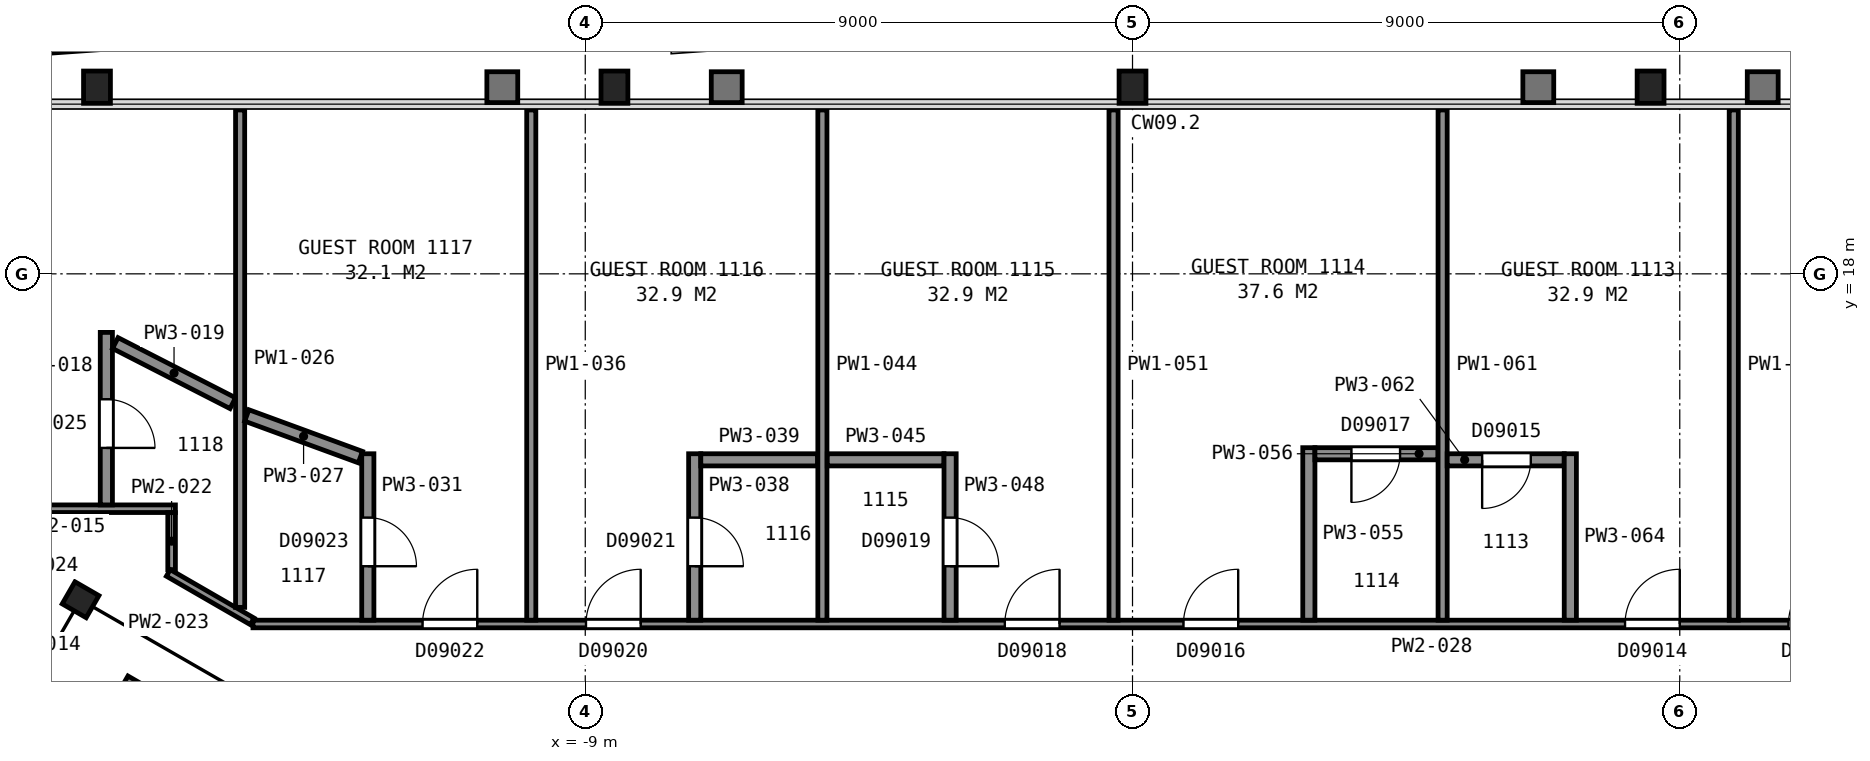
"""IFC4 building model, lengths in metres.
Left out: names, types, materials, properties, quantities, classifications, styles, units other than length and angle.
Written with IfcOpenShell. Run it as: python <this file> out.ifc"""

import sys

from ifc_helpers import new_model, si_unit, direction, frame, frame_2d, origin, origin_2d, place, context, subcontext, project, spatial, rectangle, i_section, extrude, element, fill, save


model = new_model("IFC4")
c1 = context("Model", 3, precision=1e-05, world=origin(), true_north=direction((0.0, 1.0)))
c2 = subcontext(c1, "Body", "Model", "MODEL_VIEW")
j1 = project(units=[si_unit("LENGTHUNIT", "METRE"), si_unit("PLANEANGLEUNIT", "RADIAN")], contexts=[c1])
p1 = place(None, origin())
s1 = spatial("IfcSite", under=j1, at=p1, CompositionType="ELEMENT")
p2 = place(p1, origin())
s2 = spatial("IfcBuilding", under=s1, at=p2, CompositionType="ELEMENT")
p3 = place(p2, frame((0.0, 0.0, 54.8)))
s3 = spatial("IfcBuildingStorey", under=s2, at=p3, CompositionType="ELEMENT", Elevation=54.8)
for number, where, z_axis, x_axis in (
    (1, (8.52, 21.07, 0.0), (0.0, 0.0, 1.0), (1.0, 0.0, 0.0)),
    (2, (0.0, 21.07, 0.0), (0.0, 0.0, 1.0), (1.0, 0.0, 0.0)),
    (3, (-8.52, 21.07, 0.0), (0.0, 0.0, 1.0), (1.0, 0.0, 0.0)),
    (4, (-17.03, 21.07, 0.0), (0.0, 0.0, 1.0), (1.0, 0.0, 0.0)),
):
    element("IfcColumn", number, at=place(p3, frame(where, z_axis=z_axis, x_axis=x_axis)), inside=s3, PredefinedType="COLUMN", context=c2, shape_type="SweptSolid", body=[
        extrude(i_section(OverallWidth=0.442, OverallDepth=0.531, WebThickness=0.066, FlangeThickness=0.106, FilletRadius=0.015, at=origin_2d()), origin(), (0.0, 0.0, 1.0), 3.6),
    ])
p4 = place(p3, frame((-17.3, 12.64, 0.0), z_axis=(0.0, 0.0, 1.0), x_axis=(0.5, 0.866025403784, 0.0)))
e5 = element("IfcColumn", 5, at=p4, inside=s3, PredefinedType="COLUMN", context=c2, shape_type="SweptSolid", body=[
    extrude(i_section(OverallWidth=0.419, OverallDepth=0.455, WebThickness=0.042, FlangeThickness=0.068, FilletRadius=0.015, at=origin_2d()), origin(), (0.0, 0.0, 1.0), 3.6),
])
for number, where, z_axis, x_axis in (
    (6, (6.178, 5.299, 0.0), (0.0, 0.0, 1.0), (0.866, 0.5, 0.0)),
    (7, (-6.178, 5.299, 0.0), (0.0, 0.0, 1.0), (-0.866, 0.5, 0.0)),
):
    element("IfcWall", number, at=place(p3, frame(where, z_axis=z_axis, x_axis=x_axis)), inside=s3, PredefinedType="PARTITIONING", context=c2, shape_type="SweptSolid", body=[
        extrude(rectangle(XDim=12.0, YDim=0.2, at=frame_2d((6.0, 0.0))), origin(), (0.0, 0.0, 1.0), 3.35),
    ])
p5 = place(p3, frame((-18.86, 14.137, 0.0), z_axis=(0.0, 0.0, 1.0), x_axis=(1.0, 0.0, 0.0)))
e8 = element("IfcWall", 8, at=p5, inside=s3, PredefinedType="PARTITIONING", context=c2, shape_type="SweptSolid", body=[
    extrude(rectangle(XDim=3.119, YDim=0.125, at=frame_2d((1.56, 0.0))), origin(), (0.0, 0.0, 1.0), 2.613),
])
p6 = place(p3, frame((-16.876, 17.037, 0.0), z_axis=(0.0, 0.0, 1.0), x_axis=(0.0, -1.0, 0.0)))
e9 = element("IfcWall", 9, at=p6, inside=s3, PredefinedType="PARTITIONING", context=c2, shape_type="SweptSolid", body=[
    extrude(rectangle(XDim=2.838, YDim=0.2, at=frame_2d((1.419, 0.0))), origin(), (0.0, 0.0, 1.0), 2.613),
])
p7 = place(p6, frame((1.1, 0.0, 0.0)))
e10 = element("IfcOpeningElement", 10, at=p7, cuts=e9, PredefinedType="OPENING", context=c2, shape_type="SweptSolid", body=[
    extrude(rectangle(XDim=0.8, YDim=2.1, at=frame_2d((0.4, 1.05))), frame((0.0, 0.11, 0.0), z_axis=(0.0, -1.0, 0.0), x_axis=(1.0, 0.0, 0.0)), (0.0, 0.0, 1.0), 0.22),
])
p8 = place(p3, frame((-16.729, 16.862, 0.0), z_axis=(0.0, 0.0, 1.0), x_axis=(0.890181338078, -0.455606392995, 0.0)))
e11 = element("IfcWall", 11, at=p8, inside=s3, PredefinedType="PARTITIONING", context=c2, shape_type="SweptSolid", body=[
    extrude(rectangle(XDim=2.171, YDim=0.2, at=frame_2d((1.085, 0.0))), origin(), (0.0, 0.0, 1.0), 2.613),
])
p9 = place(p3, frame((-15.803, 13.135, 0.0), z_axis=(0.0, 0.0, 1.0), x_axis=(0.0, 1.0, 0.0)))
e12 = element("IfcWall", 12, at=p9, inside=s3, PredefinedType="PARTITIONING", context=c2, shape_type="SweptSolid", body=[
    extrude(rectangle(XDim=0.937, YDim=0.125, at=frame_2d((0.469, 0.0))), origin(), (0.0, 0.0, 1.0), 2.613),
])
p10 = place(p3, frame((-15.857, 13.081, 0.0), z_axis=(0.0, 0.0, 1.0), x_axis=(0.865974057503, -0.500088923824, 0.0)))
e13 = element("IfcWall", 13, at=p10, inside=s3, PredefinedType="PARTITIONING", context=c2, shape_type="SweptSolid", body=[
    extrude(rectangle(XDim=1.595, YDim=0.125, at=frame_2d((0.798, 0.0))), origin(), (0.0, 0.0, 1.0), 2.613),
])
p11 = place(p3, frame((-14.676, 12.514, 0.0), z_axis=(0.0, 0.0, 1.0), x_axis=(0.0, 1.0, 0.0)))
e14 = element("IfcWall", 14, at=p11, inside=s3, PredefinedType="PARTITIONING", context=c2, shape_type="SweptSolid", body=[
    extrude(rectangle(XDim=8.181, YDim=0.15, at=frame_2d((4.09, 0.0))), origin(), (0.0, 0.0, 1.0), 2.613),
])
p12 = place(p3, frame((-14.567, 15.671, 0.0), z_axis=(0.0, 0.0, 1.0), x_axis=(0.938894816734, -0.344204188105, 0.0)))
e15 = element("IfcWall", 15, at=p12, inside=s3, PredefinedType="PARTITIONING", context=c2, shape_type="SweptSolid", body=[
    extrude(rectangle(XDim=1.99, YDim=0.2, at=frame_2d((0.995, 0.0))), origin(), (0.0, 0.0, 1.0), 2.613),
])
p13 = place(p3, frame((-14.465, 12.241, 0.0), z_axis=(0.0, 0.0, 1.0), x_axis=(1.0, 0.0, 0.0)))
e16 = element("IfcWall", 16, at=p13, inside=s3, PredefinedType="PARTITIONING", context=c2, shape_type="SweptSolid", body=[
    extrude(rectangle(XDim=28.929, YDim=0.125, at=frame_2d((14.465, 0.0))), origin(), (0.0, 0.0, 1.0), 2.613),
])
p14 = place(p13, frame((25.252, 0.0, 0.0)))
e17 = element("IfcOpeningElement", 17, at=p14, cuts=e16, PredefinedType="OPENING", context=c2, shape_type="SweptSolid", body=[
    extrude(rectangle(XDim=0.9, YDim=2.1, at=frame_2d((0.45, 1.05))), frame((0.0, 0.073, 0.0), z_axis=(0.0, -1.0, 0.0), x_axis=(1.0, 0.0, 0.0)), (0.0, 0.0, 1.0), 0.145),
])
p15 = place(p13, frame((22.564, 0.0, 0.0)))
e18 = element("IfcOpeningElement", 18, at=p15, cuts=e16, PredefinedType="OPENING", context=c2, shape_type="SweptSolid", body=[
    extrude(rectangle(XDim=0.9, YDim=2.1, at=frame_2d((0.45, 1.05))), frame((0.0, 0.073, 0.0), z_axis=(0.0, -1.0, 0.0), x_axis=(1.0, 0.0, 0.0)), (0.0, 0.0, 1.0), 0.145),
])
p16 = place(p13, frame((15.302, 0.0, 0.0)))
e19 = element("IfcOpeningElement", 19, at=p16, cuts=e16, PredefinedType="OPENING", context=c2, shape_type="SweptSolid", body=[
    extrude(rectangle(XDim=0.9, YDim=2.1, at=frame_2d((0.45, 1.05))), frame((0.0, 0.073, 0.0), z_axis=(0.0, -1.0, 0.0), x_axis=(1.0, 0.0, 0.0)), (0.0, 0.0, 1.0), 0.145),
])
p17 = place(p13, frame((12.365, 0.0, 0.0)))
e20 = element("IfcOpeningElement", 20, at=p17, cuts=e16, PredefinedType="OPENING", context=c2, shape_type="SweptSolid", body=[
    extrude(rectangle(XDim=0.9, YDim=2.1, at=frame_2d((0.45, 1.05))), frame((0.0, 0.073, 0.0), z_axis=(0.0, -1.0, 0.0), x_axis=(1.0, 0.0, 0.0)), (0.0, 0.0, 1.0), 0.145),
])
p18 = place(p13, frame((5.477, 0.0, 0.0)))
e21 = element("IfcOpeningElement", 21, at=p18, cuts=e16, PredefinedType="OPENING", context=c2, shape_type="SweptSolid", body=[
    extrude(rectangle(XDim=0.9, YDim=2.1, at=frame_2d((0.45, 1.05))), frame((0.0, 0.073, 0.0), z_axis=(0.0, -1.0, 0.0), x_axis=(1.0, 0.0, 0.0)), (0.0, 0.0, 1.0), 0.145),
])
p19 = place(p13, frame((2.789, 0.0, 0.0)))
e22 = element("IfcOpeningElement", 22, at=p19, cuts=e16, PredefinedType="OPENING", context=c2, shape_type="SweptSolid", body=[
    extrude(rectangle(XDim=0.9, YDim=2.1, at=frame_2d((0.45, 1.05))), frame((0.0, 0.073, 0.0), z_axis=(0.0, -1.0, 0.0), x_axis=(1.0, 0.0, 0.0)), (0.0, 0.0, 1.0), 0.145),
])
p20 = place(p3, frame((-12.576, 12.303, 0.0), z_axis=(0.0, 0.0, 1.0), x_axis=(0.0, 1.0, 0.0)))
e23 = element("IfcWall", 23, at=p20, inside=s3, PredefinedType="PARTITIONING", context=c2, shape_type="SweptSolid", body=[
    extrude(rectangle(XDim=2.738, YDim=0.2, at=frame_2d((1.369, 0.0))), origin(), (0.0, 0.0, 1.0), 2.613),
])
p21 = place(p20, frame((0.887, 0.0, 0.0)))
e24 = element("IfcOpeningElement", 24, at=p21, cuts=e23, PredefinedType="OPENING", context=c2, shape_type="SweptSolid", body=[
    extrude(rectangle(XDim=0.8, YDim=2.1, at=frame_2d((0.4, 1.05))), frame((0.0, 0.11, 0.0), z_axis=(0.0, -1.0, 0.0), x_axis=(1.0, 0.0, 0.0)), (0.0, 0.0, 1.0), 0.22),
])
p22 = place(p3, frame((-9.888, 12.303, 0.0), z_axis=(0.0, 0.0, 1.0), x_axis=(0.0, 1.0, 0.0)))
e25 = element("IfcWall", 25, at=p22, inside=s3, PredefinedType="PARTITIONING", context=c2, shape_type="SweptSolid", body=[
    extrude(rectangle(XDim=8.392, YDim=0.15, at=frame_2d((4.196, 0.0))), origin(), (0.0, 0.0, 1.0), 2.613),
])
p23 = place(p3, frame((-7.2, 15.041, 0.0), z_axis=(0.0, 0.0, 1.0), x_axis=(0.0, -1.0, 0.0)))
e26 = element("IfcWall", 26, at=p23, inside=s3, PredefinedType="PARTITIONING", context=c2, shape_type="SweptSolid", body=[
    extrude(rectangle(XDim=2.738, YDim=0.2, at=frame_2d((1.369, 0.0))), origin(), (0.0, 0.0, 1.0), 2.613),
])
p24 = place(p23, frame((1.05, 0.0, 0.0)))
e27 = element("IfcOpeningElement", 27, at=p24, cuts=e26, PredefinedType="OPENING", context=c2, shape_type="SweptSolid", body=[
    extrude(rectangle(XDim=0.8, YDim=2.1, at=frame_2d((0.4, 1.05))), frame((0.0, 0.11, 0.0), z_axis=(0.0, -1.0, 0.0), x_axis=(1.0, 0.0, 0.0)), (0.0, 0.0, 1.0), 0.22),
])
p25 = place(p3, frame((-7.1, 14.941, 0.0), z_axis=(0.0, 0.0, 1.0), x_axis=(1.0, 0.0, 0.0)))
e28 = element("IfcWall", 28, at=p25, inside=s3, PredefinedType="PARTITIONING", context=c2, shape_type="SweptSolid", body=[
    extrude(rectangle(XDim=1.92, YDim=0.2, at=frame_2d((0.96, 0.0))), origin(), (0.0, 0.0, 1.0), 2.613),
])
p26 = place(p3, frame((-5.1, 12.303, 0.0), z_axis=(0.0, 0.0, 1.0), x_axis=(0.0, 1.0, 0.0)))
e29 = element("IfcWall", 29, at=p26, inside=s3, PredefinedType="PARTITIONING", context=c2, shape_type="SweptSolid", body=[
    extrude(rectangle(XDim=8.392, YDim=0.15, at=frame_2d((4.196, 0.0))), origin(), (0.0, 0.0, 1.0), 2.613),
])
p27 = place(p3, frame((-5.02, 14.941, 0.0), z_axis=(0.0, 0.0, 1.0), x_axis=(1.0, 0.0, 0.0)))
e30 = element("IfcWall", 30, at=p27, inside=s3, PredefinedType="PARTITIONING", context=c2, shape_type="SweptSolid", body=[
    extrude(rectangle(XDim=1.92, YDim=0.2, at=frame_2d((0.96, 0.0))), origin(), (0.0, 0.0, 1.0), 2.613),
])
p28 = place(p3, frame((-3.0, 12.303, 0.0), z_axis=(0.0, 0.0, 1.0), x_axis=(0.0, 1.0, 0.0)))
e31 = element("IfcWall", 31, at=p28, inside=s3, PredefinedType="PARTITIONING", context=c2, shape_type="SweptSolid", body=[
    extrude(rectangle(XDim=2.738, YDim=0.2, at=frame_2d((1.369, 0.0))), origin(), (0.0, 0.0, 1.0), 2.613),
])
p29 = place(p28, frame((0.887, 0.0, 0.0)))
e32 = element("IfcOpeningElement", 32, at=p29, cuts=e31, PredefinedType="OPENING", context=c2, shape_type="SweptSolid", body=[
    extrude(rectangle(XDim=0.8, YDim=2.1, at=frame_2d((0.4, 1.05))), frame((0.0, 0.11, 0.0), z_axis=(0.0, -1.0, 0.0), x_axis=(1.0, 0.0, 0.0)), (0.0, 0.0, 1.0), 0.22),
])
p30 = place(p3, frame((-0.312, 12.303, 0.0), z_axis=(0.0, 0.0, 1.0), x_axis=(0.0, 1.0, 0.0)))
e33 = element("IfcWall", 33, at=p30, inside=s3, PredefinedType="PARTITIONING", context=c2, shape_type="SweptSolid", body=[
    extrude(rectangle(XDim=8.392, YDim=0.15, at=frame_2d((4.196, 0.0))), origin(), (0.0, 0.0, 1.0), 2.613),
])
p31 = place(p3, frame((2.9, 12.303, 0.0), z_axis=(0.0, 0.0, 1.0), x_axis=(0.0, 1.0, 0.0)))
e34 = element("IfcWall", 34, at=p31, inside=s3, PredefinedType="PARTITIONING", context=c2, shape_type="SweptSolid", body=[
    extrude(rectangle(XDim=2.838, YDim=0.2, at=frame_2d((1.419, 0.0))), origin(), (0.0, 0.0, 1.0), 2.613),
])
p32 = place(p3, frame((5.025, 15.041, 0.0), z_axis=(0.0, 0.0, 1.0), x_axis=(-1.0, 0.0, 0.0)))
e35 = element("IfcWall", 35, at=p32, inside=s3, PredefinedType="PARTITIONING", context=c2, shape_type="SweptSolid", body=[
    extrude(rectangle(XDim=2.025, YDim=0.2, at=frame_2d((1.012, 0.0))), origin(), (0.0, 0.0, 1.0), 2.613),
])
p33 = place(p32, frame((0.625, 0.0, 0.0)))
e36 = element("IfcOpeningElement", 36, at=p33, cuts=e35, PredefinedType="OPENING", context=c2, shape_type="SweptSolid", body=[
    extrude(rectangle(XDim=0.8, YDim=2.1, at=frame_2d((0.4, 1.05))), frame((0.0, 0.11, 0.0), z_axis=(0.0, -1.0, 0.0), x_axis=(1.0, 0.0, 0.0)), (0.0, 0.0, 1.0), 0.22),
])
p34 = place(p3, frame((5.1, 12.303, 0.0), z_axis=(0.0, 0.0, 1.0), x_axis=(0.0, 1.0, 0.0)))
e37 = element("IfcWall", 37, at=p34, inside=s3, PredefinedType="PARTITIONING", context=c2, shape_type="SweptSolid", body=[
    extrude(rectangle(XDim=8.392, YDim=0.15, at=frame_2d((4.196, 0.0))), origin(), (0.0, 0.0, 1.0), 2.613),
])
p35 = place(p3, frame((7.1, 14.941, 0.0), z_axis=(0.0, 0.0, 1.0), x_axis=(-1.0, 0.0, 0.0)))
e38 = element("IfcWall", 38, at=p35, inside=s3, PredefinedType="PARTITIONING", context=c2, shape_type="SweptSolid", body=[
    extrude(rectangle(XDim=1.925, YDim=0.2, at=frame_2d((0.962, 0.0))), origin(), (0.0, 0.0, 1.0), 2.613),
])
p36 = place(p35, frame((0.55, 0.0, 0.0)))
e39 = element("IfcOpeningElement", 39, at=p36, cuts=e38, PredefinedType="OPENING", context=c2, shape_type="SweptSolid", body=[
    extrude(rectangle(XDim=0.8, YDim=2.1, at=frame_2d((0.4, 1.05))), frame((0.0, 0.11, 0.0), z_axis=(0.0, -1.0, 0.0), x_axis=(1.0, 0.0, 0.0)), (0.0, 0.0, 1.0), 0.22),
])
p37 = place(p3, frame((7.2, 12.303, 0.0), z_axis=(0.0, 0.0, 1.0), x_axis=(0.0, 1.0, 0.0)))
e40 = element("IfcWall", 40, at=p37, inside=s3, PredefinedType="PARTITIONING", context=c2, shape_type="SweptSolid", body=[
    extrude(rectangle(XDim=2.738, YDim=0.2, at=frame_2d((1.369, 0.0))), origin(), (0.0, 0.0, 1.0), 2.613),
])
p38 = place(p3, frame((9.888, 12.303, 0.0), z_axis=(0.0, 0.0, 1.0), x_axis=(0.0, 1.0, 0.0)))
e41 = element("IfcWall", 41, at=p38, inside=s3, PredefinedType="PARTITIONING", context=c2, shape_type="SweptSolid", body=[
    extrude(rectangle(XDim=8.392, YDim=0.15, at=frame_2d((4.196, 0.0))), origin(), (0.0, 0.0, 1.0), 2.613),
])
p39 = place(p7, origin())
e42 = element("IfcDoor", 42, at=p39, inside=s3, OperationType="SINGLE_SWING_RIGHT", PredefinedType="DOOR", context=c2, shape_type="SweptSolid", body=[
    extrude(rectangle(XDim=0.8, YDim=2.1, at=frame_2d((0.4, 1.05))), frame((0.0, 0.025, 0.0), z_axis=(0.0, -1.0, 0.0), x_axis=(1.0, 0.0, 0.0)), (0.0, 0.0, 1.0), 0.05),
])
fill(e10, e42)
p40 = place(p14, origin())
e43 = element("IfcDoor", 43, at=p40, inside=s3, OperationType="SINGLE_SWING_RIGHT", PredefinedType="DOOR", context=c2, shape_type="SweptSolid", body=[
    extrude(rectangle(XDim=0.9, YDim=2.1, at=frame_2d((0.45, 1.05))), frame((0.0, 0.025, 0.0), z_axis=(0.0, -1.0, 0.0), x_axis=(1.0, 0.0, 0.0)), (0.0, 0.0, 1.0), 0.05),
])
fill(e17, e43)
p41 = place(p15, origin())
e44 = element("IfcDoor", 44, at=p41, inside=s3, OperationType="SINGLE_SWING_RIGHT", PredefinedType="DOOR", context=c2, shape_type="SweptSolid", body=[
    extrude(rectangle(XDim=0.9, YDim=2.1, at=frame_2d((0.45, 1.05))), frame((0.0, 0.025, 0.0), z_axis=(0.0, -1.0, 0.0), x_axis=(1.0, 0.0, 0.0)), (0.0, 0.0, 1.0), 0.05),
])
fill(e18, e44)
p42 = place(p16, origin())
e45 = element("IfcDoor", 45, at=p42, inside=s3, OperationType="SINGLE_SWING_RIGHT", PredefinedType="DOOR", context=c2, shape_type="SweptSolid", body=[
    extrude(rectangle(XDim=0.9, YDim=2.1, at=frame_2d((0.45, 1.05))), frame((0.0, 0.025, 0.0), z_axis=(0.0, -1.0, 0.0), x_axis=(1.0, 0.0, 0.0)), (0.0, 0.0, 1.0), 0.05),
])
fill(e19, e45)
p43 = place(p17, origin())
e46 = element("IfcDoor", 46, at=p43, inside=s3, OperationType="SINGLE_SWING_RIGHT", PredefinedType="DOOR", context=c2, shape_type="SweptSolid", body=[
    extrude(rectangle(XDim=0.9, YDim=2.1, at=frame_2d((0.45, 1.05))), frame((0.0, 0.025, 0.0), z_axis=(0.0, -1.0, 0.0), x_axis=(1.0, 0.0, 0.0)), (0.0, 0.0, 1.0), 0.05),
])
fill(e20, e46)
p44 = place(p18, origin())
e47 = element("IfcDoor", 47, at=p44, inside=s3, OperationType="SINGLE_SWING_RIGHT", PredefinedType="DOOR", context=c2, shape_type="SweptSolid", body=[
    extrude(rectangle(XDim=0.9, YDim=2.1, at=frame_2d((0.45, 1.05))), frame((0.0, 0.025, 0.0), z_axis=(0.0, -1.0, 0.0), x_axis=(1.0, 0.0, 0.0)), (0.0, 0.0, 1.0), 0.05),
])
fill(e21, e47)
p45 = place(p19, origin())
e48 = element("IfcDoor", 48, at=p45, inside=s3, OperationType="SINGLE_SWING_RIGHT", PredefinedType="DOOR", context=c2, shape_type="SweptSolid", body=[
    extrude(rectangle(XDim=0.9, YDim=2.1, at=frame_2d((0.45, 1.05))), frame((0.0, 0.025, 0.0), z_axis=(0.0, -1.0, 0.0), x_axis=(1.0, 0.0, 0.0)), (0.0, 0.0, 1.0), 0.05),
])
fill(e22, e48)
p46 = place(p21, origin())
e49 = element("IfcDoor", 49, at=p46, inside=s3, OperationType="SINGLE_SWING_LEFT", PredefinedType="DOOR", context=c2, shape_type="SweptSolid", body=[
    extrude(rectangle(XDim=0.8, YDim=2.1, at=frame_2d((0.4, 1.05))), frame((0.0, 0.025, 0.0), z_axis=(0.0, -1.0, 0.0), x_axis=(1.0, 0.0, 0.0)), (0.0, 0.0, 1.0), 0.05),
])
fill(e24, e49)
p47 = place(p24, origin())
e50 = element("IfcDoor", 50, at=p47, inside=s3, OperationType="SINGLE_SWING_RIGHT", PredefinedType="DOOR", context=c2, shape_type="SweptSolid", body=[
    extrude(rectangle(XDim=0.8, YDim=2.1, at=frame_2d((0.4, 1.05))), frame((0.0, 0.025, 0.0), z_axis=(0.0, -1.0, 0.0), x_axis=(1.0, 0.0, 0.0)), (0.0, 0.0, 1.0), 0.05),
])
fill(e27, e50)
p48 = place(p29, origin())
e51 = element("IfcDoor", 51, at=p48, inside=s3, OperationType="SINGLE_SWING_LEFT", PredefinedType="DOOR", context=c2, shape_type="SweptSolid", body=[
    extrude(rectangle(XDim=0.8, YDim=2.1, at=frame_2d((0.4, 1.05))), frame((0.0, 0.025, 0.0), z_axis=(0.0, -1.0, 0.0), x_axis=(1.0, 0.0, 0.0)), (0.0, 0.0, 1.0), 0.05),
])
fill(e32, e51)
p49 = place(p33, origin())
e52 = element("IfcDoor", 52, at=p49, inside=s3, OperationType="SINGLE_SWING_RIGHT", PredefinedType="DOOR", context=c2, shape_type="SweptSolid", body=[
    extrude(rectangle(XDim=0.8, YDim=2.1, at=frame_2d((0.4, 1.05))), frame((0.0, 0.025, 0.0), z_axis=(0.0, -1.0, 0.0), x_axis=(1.0, 0.0, 0.0)), (0.0, 0.0, 1.0), 0.05),
])
fill(e36, e52)
p50 = place(p36, origin())
e53 = element("IfcDoor", 53, at=p50, inside=s3, OperationType="SINGLE_SWING_RIGHT", PredefinedType="DOOR", context=c2, shape_type="SweptSolid", body=[
    extrude(rectangle(XDim=0.8, YDim=2.1, at=frame_2d((0.4, 1.05))), frame((0.0, 0.025, 0.0), z_axis=(0.0, -1.0, 0.0), x_axis=(1.0, 0.0, 0.0)), (0.0, 0.0, 1.0), 0.05),
])
fill(e39, e53)
save(model, sys.argv[1])
